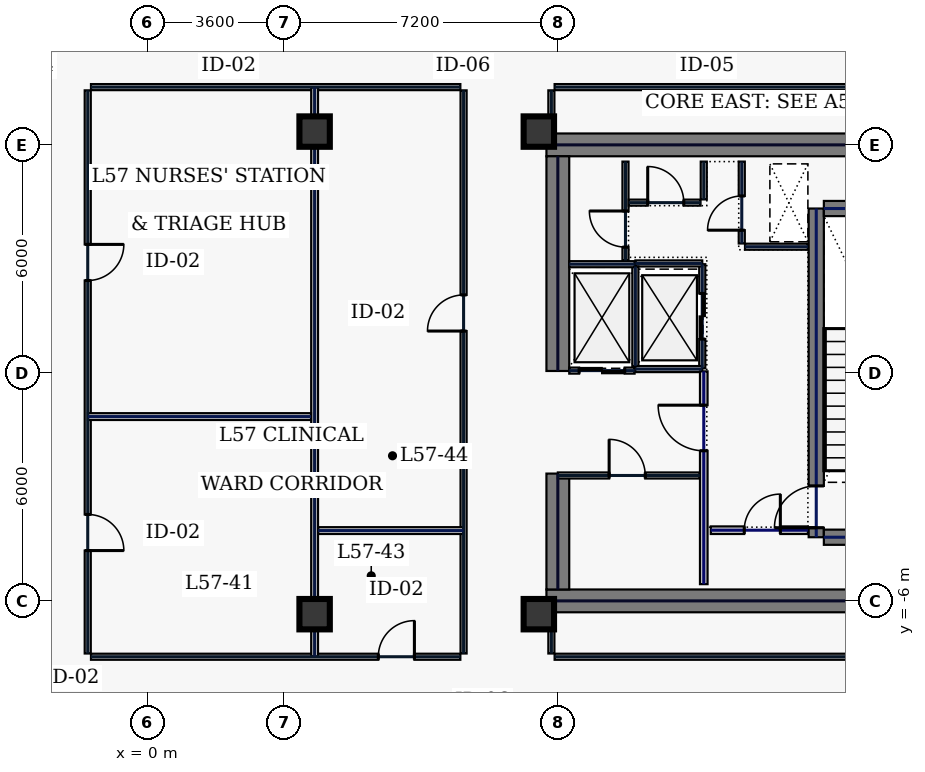
"""IFC4 building model, lengths in metres.
Left out: names, types, materials, properties, quantities, classifications, styles, units other than length and angle.
Written with IfcOpenShell. Run it as: python <this file> out.ifc"""

import sys

from ifc_helpers import new_model, si_unit, direction, frame, frame_2d, origin, origin_2d, place, context, subcontext, project, spatial, rectangle, hollow_rectangle, extrude, element, fill, save


model = new_model("IFC4")
c1 = context("Model", 3, precision=1e-05, world=origin(), true_north=direction((0.0, 1.0)))
c2 = subcontext(c1, "Body", "Model", "MODEL_VIEW")
j1 = project(units=[si_unit("LENGTHUNIT", "METRE"), si_unit("PLANEANGLEUNIT", "RADIAN")], contexts=[c1])
p1 = place(None, origin())
s1 = spatial("IfcSite", under=j1, at=p1, CompositionType="ELEMENT")
p2 = place(p1, origin())
s2 = spatial("IfcBuilding", under=s1, at=p2, CompositionType="ELEMENT")
p3 = place(p2, frame((0.0, 0.0, 247.0)))
s3 = spatial("IfcBuildingStorey", under=s2, at=p3, CompositionType="ELEMENT", Elevation=247.0)
for number, where, z_axis, x_axis in (
    (1, (10.5, 6.0, 0.0), (0.0, 0.0, 1.0), (1.0, 0.0, 0.0)),
    (2, (10.5, -6.0, 0.0), (0.0, 0.0, 1.0), (1.0, 0.0, 0.0)),
):
    element("IfcWall", number, at=place(p3, frame(where, z_axis=z_axis, x_axis=x_axis)), inside=s3, PredefinedType="SHEAR", context=c2, shape_type="SweptSolid", body=[
        extrude(rectangle(XDim=11.5, YDim=0.6, at=frame_2d((5.75, 0.0))), origin(), (0.0, 0.0, 1.0), 3.74),
    ])
p4 = place(p3, frame((10.8, -5.7, 0.0), z_axis=(0.0, 0.0, 1.0), x_axis=(0.0, 1.0, 0.0)))
e3 = element("IfcWall", 3, at=p4, inside=s3, PredefinedType="SHEAR", context=c2, shape_type="SweptSolid", body=[
    extrude(rectangle(XDim=3.05, YDim=0.6, at=frame_2d((1.525, 0.0))), origin(), (0.0, 0.0, 1.0), 3.74),
])
p5 = place(p3, frame((10.8, 0.05, 0.0), z_axis=(0.0, 0.0, 1.0), x_axis=(0.0, 1.0, 0.0)))
e4 = element("IfcWall", 4, at=p5, inside=s3, PredefinedType="SHEAR", context=c2, shape_type="SweptSolid", body=[
    extrude(rectangle(XDim=5.65, YDim=0.6, at=frame_2d((2.825, 0.0))), origin(), (0.0, 0.0, 1.0), 3.74),
])
p6 = place(p3, frame((17.6, -4.325, 0.0), z_axis=(0.0, 0.0, 1.0), x_axis=(0.0, 1.0, 0.0)))
e5 = element("IfcWall", 5, at=p6, inside=s3, PredefinedType="SHEAR", context=c2, shape_type="SweptSolid", body=[
    extrude(rectangle(XDim=8.65, YDim=0.4, at=frame_2d((4.325, 0.0))), origin(), (0.0, 0.0, 1.0), 3.74),
])
p7 = place(p6, frame((0.25, 0.0, 0.0)))
e6 = element("IfcOpeningElement", 6, at=p7, cuts=e5, PredefinedType="OPENING", context=c2, shape_type="SweptSolid", body=[
    extrude(rectangle(XDim=1.1, YDim=2.2, at=frame_2d((0.55, 1.1))), frame((0.0, 0.21, 0.0), z_axis=(0.0, -1.0, 0.0), x_axis=(1.0, 0.0, 0.0)), (0.0, 0.0, 1.0), 0.42),
])
for number, where, z_axis, x_axis in (
    (7, (17.8, -4.325, 0.0), (0.0, 0.0, 1.0), (1.0, 0.0, 0.0)),
    (8, (17.8, 4.325, 0.0), (0.0, 0.0, 1.0), (1.0, 0.0, 0.0)),
):
    element("IfcWall", number, at=place(p3, frame(where, z_axis=z_axis, x_axis=x_axis)), inside=s3, PredefinedType="SHEAR", context=c2, shape_type="SweptSolid", body=[
        extrude(rectangle(XDim=3.4, YDim=0.4, at=frame_2d((1.7, 0.0))), origin(), (0.0, 0.0, 1.0), 3.74),
    ])
for number, where, z_axis, x_axis in (
    (9, (10.3, -6.35, 0.0), (0.0, 0.0, 1.0), (1.0, 0.0, 0.0)),
    (10, (10.3, 6.35, 0.0), (0.0, 0.0, 1.0), (1.0, 0.0, 0.0)),
    (11, (4.4, -6.35, 0.0), (0.0, 0.0, 1.0), (1.0, 0.0, 0.0)),
    (12, (4.4, 6.35, 0.0), (0.0, 0.0, 1.0), (1.0, 0.0, 0.0)),
):
    element("IfcColumn", number, at=place(p3, frame(where, z_axis=z_axis, x_axis=x_axis)), inside=s3, PredefinedType="COLUMN", context=c2, shape_type="SweptSolid", body=[
        extrude(hollow_rectangle(XDim=0.8, YDim=0.8, WallThickness=0.036, at=origin_2d()), origin(), (0.0, 0.0, 1.0), 3.74),
    ])
p8 = place(p3, frame((14.6, 0.12, 0.0), z_axis=(0.0, 0.0, 1.0), x_axis=(0.0, 1.0, 0.0)))
e13 = element("IfcWall", 13, at=p8, inside=s3, PredefinedType="PARTITIONING", context=c2, shape_type="SweptSolid", body=[
    extrude(rectangle(XDim=2.74, YDim=0.16, at=frame_2d((1.37, 0.0))), origin(), (0.0, 0.0, 1.0), 3.74),
])
p9 = place(p8, frame((0.77, 0.0, 0.0)))
e14 = element("IfcOpeningElement", 14, at=p9, cuts=e13, PredefinedType="OPENING", context=c2, shape_type="SweptSolid", body=[
    extrude(rectangle(XDim=1.2, YDim=2.2, at=frame_2d((0.6, 1.1))), frame((0.0, 0.09, 0.0), z_axis=(0.0, -1.0, 0.0), x_axis=(1.0, 0.0, 0.0)), (0.0, 0.0, 1.0), 0.18),
])
for number, where, z_axis, x_axis in (
    (15, (12.84, 0.1, 0.0), (0.0, 0.0, 1.0), (1.0, 0.0, 0.0)),
    (16, (12.84, 2.88, 0.0), (0.0, 0.0, 1.0), (1.0, 0.0, 0.0)),
):
    element("IfcWall", number, at=place(p3, frame(where, z_axis=z_axis, x_axis=x_axis)), inside=s3, PredefinedType="PARTITIONING", context=c2, shape_type="SweptSolid", body=[
        extrude(rectangle(XDim=1.76, YDim=0.16, at=frame_2d((0.88, 0.0))), origin(), (0.0, 0.0, 1.0), 3.74),
    ])
p10 = place(p3, frame((12.84, 0.18, 0.0), z_axis=(0.0, 0.0, 1.0), x_axis=(0.0, 1.0, 0.0)))
e17 = element("IfcWall", 17, at=p10, inside=s3, PredefinedType="PARTITIONING", context=c2, shape_type="SweptSolid", body=[
    extrude(rectangle(XDim=2.62, YDim=0.16, at=frame_2d((1.31, 0.0))), origin(), (0.0, 0.0, 1.0), 3.74),
])
p11 = place(p3, frame((11.1, 0.06, 0.0), z_axis=(0.0, 0.0, 1.0), x_axis=(1.0, 0.0, 0.0)))
e18 = element("IfcWall", 18, at=p11, inside=s3, PredefinedType="PARTITIONING", context=c2, shape_type="SweptSolid", body=[
    extrude(rectangle(XDim=1.72, YDim=0.16, at=frame_2d((0.86, 0.0))), origin(), (0.0, 0.0, 1.0), 3.74),
])
p12 = place(p11, frame((0.26, 0.0, 0.0)))
e19 = element("IfcOpeningElement", 19, at=p12, cuts=e18, PredefinedType="OPENING", context=c2, shape_type="SweptSolid", body=[
    extrude(rectangle(XDim=1.2, YDim=2.2, at=frame_2d((0.6, 1.1))), frame((0.0, 0.09, 0.0), z_axis=(0.0, -1.0, 0.0), x_axis=(1.0, 0.0, 0.0)), (0.0, 0.0, 1.0), 0.18),
])
p13 = place(p3, frame((11.1, 2.86, 0.0), z_axis=(0.0, 0.0, 1.0), x_axis=(1.0, 0.0, 0.0)))
e20 = element("IfcWall", 20, at=p13, inside=s3, PredefinedType="PARTITIONING", context=c2, shape_type="SweptSolid", body=[
    extrude(rectangle(XDim=1.72, YDim=0.16, at=frame_2d((0.86, 0.0))), origin(), (0.0, 0.0, 1.0), 3.74),
])
p14 = place(p3, frame((15.64, 3.405, 0.0), z_axis=(0.0, 0.0, 1.0), x_axis=(0.0, 1.0, 0.0)))
e21 = element("IfcWall", 21, at=p14, inside=s3, PredefinedType="PARTITIONING", context=c2, shape_type="SweptSolid", body=[
    extrude(rectangle(XDim=2.155, YDim=0.16, at=frame_2d((1.078, 0.0))), origin(), (0.0, 0.0, 1.0), 3.74),
])
p15 = place(p14, frame((0.35, 0.0, 0.0)))
e22 = element("IfcOpeningElement", 22, at=p15, cuts=e21, PredefinedType="OPENING", context=c2, shape_type="SweptSolid", body=[
    extrude(rectangle(XDim=0.9, YDim=2.2, at=frame_2d((0.45, 1.1))), frame((0.0, 0.09, 0.0), z_axis=(0.0, -1.0, 0.0), x_axis=(1.0, 0.0, 0.0)), (0.0, 0.0, 1.0), 0.18),
])
p16 = place(p3, frame((15.725, 3.32, 0.0), z_axis=(0.0, 0.0, 1.0), x_axis=(1.0, 0.0, 0.0)))
e23 = element("IfcWall", 23, at=p16, inside=s3, PredefinedType="PARTITIONING", context=c2, shape_type="SweptSolid", body=[
    extrude(rectangle(XDim=1.655, YDim=0.16, at=frame_2d((0.827, 0.0))), origin(), (0.0, 0.0, 1.0), 3.74),
])
p17 = place(p3, frame((14.825, -4.14, 0.0), z_axis=(0.0, 0.0, 1.0), x_axis=(1.0, 0.0, 0.0)))
e24 = element("IfcWall", 24, at=p17, inside=s3, PredefinedType="SOLIDWALL", context=c2, shape_type="SweptSolid", body=[
    extrude(rectangle(XDim=2.555, YDim=0.2, at=frame_2d((1.277, 0.0))), origin(), (0.0, 0.0, 1.0), 3.74),
])
p18 = place(p17, frame((0.88, 0.0, 0.0)))
e25 = element("IfcOpeningElement", 25, at=p18, cuts=e24, PredefinedType="OPENING", context=c2, shape_type="SweptSolid", body=[
    extrude(rectangle(XDim=0.95, YDim=2.2, at=frame_2d((0.475, 1.1))), frame((0.0, 0.11, 0.0), z_axis=(0.0, -1.0, 0.0), x_axis=(1.0, 0.0, 0.0)), (0.0, 0.0, 1.0), 0.22),
])
p19 = place(p3, frame((10.8, -2.7, 0.0), z_axis=(0.0, 0.0, 1.0), x_axis=(1.0, 0.0, 0.0)))
e26 = element("IfcWall", 26, at=p19, inside=s3, PredefinedType="PARTITIONING", context=c2, shape_type="SweptSolid", body=[
    extrude(rectangle(XDim=3.735, YDim=0.16, at=frame_2d((1.867, 0.0))), origin(), (0.0, 0.0, 1.0), 3.74),
])
p20 = place(p19, frame((1.35, 0.0, 0.0)))
e27 = element("IfcOpeningElement", 27, at=p20, cuts=e26, PredefinedType="OPENING", context=c2, shape_type="SweptSolid", body=[
    extrude(rectangle(XDim=0.95, YDim=2.2, at=frame_2d((0.475, 1.1))), frame((0.0, 0.09, 0.0), z_axis=(0.0, -1.0, 0.0), x_axis=(1.0, 0.0, 0.0)), (0.0, 0.0, 1.0), 0.18),
])
p21 = place(p3, frame((12.58, 2.96, 0.0), z_axis=(0.0, 0.0, 1.0), x_axis=(0.0, 1.0, 0.0)))
e28 = element("IfcWall", 28, at=p21, inside=s3, PredefinedType="PARTITIONING", context=c2, shape_type="SweptSolid", body=[
    extrude(rectangle(XDim=2.6, YDim=0.16, at=frame_2d((1.3, 0.0))), origin(), (0.0, 0.0, 1.0), 3.74),
])
p22 = place(p21, frame((0.35, 0.0, 0.0)))
e29 = element("IfcOpeningElement", 29, at=p22, cuts=e28, PredefinedType="OPENING", context=c2, shape_type="SweptSolid", body=[
    extrude(rectangle(XDim=0.95, YDim=2.2, at=frame_2d((0.475, 1.1))), frame((0.0, 0.09, 0.0), z_axis=(0.0, -1.0, 0.0), x_axis=(1.0, 0.0, 0.0)), (0.0, 0.0, 1.0), 0.18),
])
p23 = place(p3, frame((12.665, 4.48, 0.0), z_axis=(0.0, 0.0, 1.0), x_axis=(1.0, 0.0, 0.0)))
e30 = element("IfcWall", 30, at=p23, inside=s3, PredefinedType="PARTITIONING", context=c2, shape_type="SweptSolid", body=[
    extrude(rectangle(XDim=1.89, YDim=0.16, at=frame_2d((0.945, 0.0))), origin(), (0.0, 0.0, 1.0), 3.74),
])
p24 = place(p23, frame((0.5, 0.0, 0.0)))
e31 = element("IfcOpeningElement", 31, at=p24, cuts=e30, PredefinedType="OPENING", context=c2, shape_type="SweptSolid", body=[
    extrude(rectangle(XDim=0.95, YDim=2.2, at=frame_2d((0.475, 1.1))), frame((0.0, 0.09, 0.0), z_axis=(0.0, -1.0, 0.0), x_axis=(1.0, 0.0, 0.0)), (0.0, 0.0, 1.0), 0.18),
])
p25 = place(p3, frame((14.64, 4.565, 0.0), z_axis=(0.0, 0.0, 1.0), x_axis=(0.0, 1.0, 0.0)))
e32 = element("IfcWall", 32, at=p25, inside=s3, PredefinedType="PARTITIONING", context=c2, shape_type="SweptSolid", body=[
    extrude(rectangle(XDim=0.995, YDim=0.16, at=frame_2d((0.498, 0.0))), origin(), (0.0, 0.0, 1.0), 3.74),
])
p26 = place(p3, frame((14.64, -5.56, 0.0), z_axis=(0.0, 0.0, 1.0), x_axis=(0.0, 1.0, 0.0)))
e33 = element("IfcWall", 33, at=p26, inside=s3, PredefinedType="SOLIDWALL", context=c2, shape_type="SweptSolid", body=[
    extrude(rectangle(XDim=5.6, YDim=0.2, at=frame_2d((2.8, 0.0))), origin(), (0.0, 0.0, 1.0), 3.74),
])
p27 = place(p26, frame((3.51, 0.0, 0.0)))
e34 = element("IfcOpeningElement", 34, at=p27, cuts=e33, PredefinedType="OPENING", context=c2, shape_type="SweptSolid", body=[
    extrude(rectangle(XDim=1.2, YDim=2.2, at=frame_2d((0.6, 1.1))), frame((0.0, 0.11, 0.0), z_axis=(0.0, -1.0, 0.0), x_axis=(1.0, 0.0, 0.0)), (0.0, 0.0, 1.0), 0.22),
])
p28 = place(p3, frame((22.585, 7.52, 0.0), z_axis=(0.0, 0.0, 1.0), x_axis=(-1.0, 0.0, 0.0)))
e35 = element("IfcWall", 35, at=p28, inside=s3, PredefinedType="PARTITIONING", context=c2, shape_type="SweptSolid", body=[
    extrude(rectangle(XDim=11.87, YDim=0.16, at=frame_2d((5.935, 0.0))), origin(), (0.0, 0.0, 1.0), 3.74),
])
p29 = place(p3, frame((10.63, 7.435, 0.0), z_axis=(0.0, 0.0, 1.0), x_axis=(0.0, -1.0, 0.0)))
e36 = element("IfcWall", 36, at=p29, inside=s3, PredefinedType="PARTITIONING", context=c2, shape_type="SweptSolid", body=[
    extrude(rectangle(XDim=1.015, YDim=0.16, at=frame_2d((0.508, 0.0))), origin(), (0.0, 0.0, 1.0), 3.74),
])
p30 = place(p3, frame((10.63, -6.42, 0.0), z_axis=(0.0, 0.0, 1.0), x_axis=(0.0, -1.0, 0.0)))
e37 = element("IfcWall", 37, at=p30, inside=s3, PredefinedType="PARTITIONING", context=c2, shape_type="SweptSolid", body=[
    extrude(rectangle(XDim=0.965, YDim=0.16, at=frame_2d((0.482, 0.0))), origin(), (0.0, 0.0, 1.0), 3.74),
])
p31 = place(p3, frame((10.715, -7.47, 0.0), z_axis=(0.0, 0.0, 1.0), x_axis=(1.0, 0.0, 0.0)))
e38 = element("IfcWall", 38, at=p31, inside=s3, PredefinedType="PARTITIONING", context=c2, shape_type="SweptSolid", body=[
    extrude(rectangle(XDim=11.87, YDim=0.16, at=frame_2d((5.935, 0.0))), origin(), (0.0, 0.0, 1.0), 3.74),
])
p32 = place(p3, frame((8.235, 7.52, 0.0), z_axis=(0.0, 0.0, 1.0), x_axis=(-1.0, 0.0, 0.0)))
e39 = element("IfcWall", 39, at=p32, inside=s3, PredefinedType="PARTITIONING", context=c2, shape_type="SweptSolid", body=[
    extrude(rectangle(XDim=9.72, YDim=0.16, at=frame_2d((4.86, 0.0))), origin(), (0.0, 0.0, 1.0), 3.74),
])
p33 = place(p3, frame((-1.57, 7.435, 0.0), z_axis=(0.0, 0.0, 1.0), x_axis=(0.0, -1.0, 0.0)))
e40 = element("IfcWall", 40, at=p33, inside=s3, PredefinedType="PARTITIONING", context=c2, shape_type="SweptSolid", body=[
    extrude(rectangle(XDim=14.82, YDim=0.16, at=frame_2d((7.41, 0.0))), origin(), (0.0, 0.0, 1.0), 3.74),
])
p34 = place(p33, frame((11.161, 0.0, 0.0)))
e41 = element("IfcOpeningElement", 41, at=p34, cuts=e40, PredefinedType="OPENING", context=c2, shape_type="SweptSolid", body=[
    extrude(rectangle(XDim=0.95, YDim=2.2, at=frame_2d((0.475, 1.1))), frame((0.0, 0.09, 0.0), z_axis=(0.0, -1.0, 0.0), x_axis=(1.0, 0.0, 0.0)), (0.0, 0.0, 1.0), 0.18),
])
p35 = place(p33, frame((4.054, 0.0, 0.0)))
e42 = element("IfcOpeningElement", 42, at=p35, cuts=e40, PredefinedType="OPENING", context=c2, shape_type="SweptSolid", body=[
    extrude(rectangle(XDim=0.95, YDim=2.2, at=frame_2d((0.475, 1.1))), frame((0.0, 0.09, 0.0), z_axis=(0.0, -1.0, 0.0), x_axis=(1.0, 0.0, 0.0)), (0.0, 0.0, 1.0), 0.18),
])
p36 = place(p3, frame((-1.485, -7.47, 0.0), z_axis=(0.0, 0.0, 1.0), x_axis=(1.0, 0.0, 0.0)))
e43 = element("IfcWall", 43, at=p36, inside=s3, PredefinedType="PARTITIONING", context=c2, shape_type="SweptSolid", body=[
    extrude(rectangle(XDim=9.72, YDim=0.16, at=frame_2d((4.86, 0.0))), origin(), (0.0, 0.0, 1.0), 3.74),
])
p37 = place(p36, frame((7.561, 0.0, 0.0)))
e44 = element("IfcOpeningElement", 44, at=p37, cuts=e43, PredefinedType="OPENING", context=c2, shape_type="SweptSolid", body=[
    extrude(rectangle(XDim=0.95, YDim=2.2, at=frame_2d((0.475, 1.1))), frame((0.0, 0.09, 0.0), z_axis=(0.0, -1.0, 0.0), x_axis=(1.0, 0.0, 0.0)), (0.0, 0.0, 1.0), 0.18),
])
p38 = place(p3, frame((8.32, -7.385, 0.0), z_axis=(0.0, 0.0, 1.0), x_axis=(0.0, 1.0, 0.0)))
e45 = element("IfcWall", 45, at=p38, inside=s3, PredefinedType="PARTITIONING", context=c2, shape_type="SweptSolid", body=[
    extrude(rectangle(XDim=14.82, YDim=0.16, at=frame_2d((7.41, 0.0))), origin(), (0.0, 0.0, 1.0), 3.74),
])
p39 = place(p38, frame((8.486, 0.0, 0.0)))
e46 = element("IfcOpeningElement", 46, at=p39, cuts=e45, PredefinedType="OPENING", context=c2, shape_type="SweptSolid", body=[
    extrude(rectangle(XDim=0.95, YDim=2.2, at=frame_2d((0.475, 1.1))), frame((0.0, 0.09, 0.0), z_axis=(0.0, -1.0, 0.0), x_axis=(1.0, 0.0, 0.0)), (0.0, 0.0, 1.0), 0.18),
])
p40 = place(p3, frame((4.4, -7.465, 0.0), z_axis=(0.0, 0.0, 1.0), x_axis=(0.0, 1.0, 0.0)))
e47 = element("IfcWall", 47, at=p40, inside=s3, PredefinedType="PARTITIONING", context=c2, shape_type="SweptSolid", body=[
    extrude(rectangle(XDim=14.98, YDim=0.18, at=frame_2d((7.49, 0.0))), origin(), (0.0, 0.0, 1.0), 3.035),
])
p41 = place(p3, frame((-1.565, -1.15, 0.0), z_axis=(0.0, 0.0, 1.0), x_axis=(1.0, 0.0, 0.0)))
e48 = element("IfcWall", 48, at=p41, inside=s3, PredefinedType="PARTITIONING", context=c2, shape_type="SweptSolid", body=[
    extrude(rectangle(XDim=5.87, YDim=0.18, at=frame_2d((2.935, 0.0))), origin(), (0.0, 0.0, 1.0), 3.74),
])
p42 = place(p3, frame((4.495, -4.15, 0.0), z_axis=(0.0, 0.0, 1.0), x_axis=(1.0, 0.0, 0.0)))
e49 = element("IfcWall", 49, at=p42, inside=s3, PredefinedType="PARTITIONING", context=c2, shape_type="SweptSolid", body=[
    extrude(rectangle(XDim=3.82, YDim=0.18, at=frame_2d((1.91, 0.0))), origin(), (0.0, 0.0, 1.0), 3.74),
])
p43 = place(p7, origin())
e50 = element("IfcDoor", 50, at=p43, inside=s3, OperationType="SINGLE_SWING_LEFT", PredefinedType="DOOR", context=c2, shape_type="SweptSolid", body=[
    extrude(rectangle(XDim=1.1, YDim=2.2, at=frame_2d((0.55, 1.1))), frame((0.0, 0.025, 0.0), z_axis=(0.0, -1.0, 0.0), x_axis=(1.0, 0.0, 0.0)), (0.0, 0.0, 1.0), 0.05),
])
fill(e6, e50)
p44 = place(p9, origin())
e51 = element("IfcDoor", 51, at=p44, inside=s3, OperationType="SLIDING_TO_LEFT", PredefinedType="DOOR", context=c2, shape_type="SweptSolid", body=[
    extrude(rectangle(XDim=1.2, YDim=2.2, at=frame_2d((0.6, 1.1))), frame((0.0, 0.025, 0.0), z_axis=(0.0, -1.0, 0.0), x_axis=(1.0, 0.0, 0.0)), (0.0, 0.0, 1.0), 0.05),
])
fill(e14, e51)
p45 = place(p12, origin())
e52 = element("IfcDoor", 52, at=p45, inside=s3, OperationType="SLIDING_TO_LEFT", PredefinedType="DOOR", context=c2, shape_type="SweptSolid", body=[
    extrude(rectangle(XDim=1.2, YDim=2.2, at=frame_2d((0.6, 1.1))), frame((0.0, 0.025, 0.0), z_axis=(0.0, -1.0, 0.0), x_axis=(1.0, 0.0, 0.0)), (0.0, 0.0, 1.0), 0.05),
])
fill(e19, e52)
p46 = place(p15, origin())
e53 = element("IfcDoor", 53, at=p46, inside=s3, OperationType="SINGLE_SWING_LEFT", PredefinedType="DOOR", context=c2, shape_type="SweptSolid", body=[
    extrude(rectangle(XDim=0.9, YDim=2.2, at=frame_2d((0.45, 1.1))), frame((0.0, 0.025, 0.0), z_axis=(0.0, -1.0, 0.0), x_axis=(1.0, 0.0, 0.0)), (0.0, 0.0, 1.0), 0.05),
])
fill(e22, e53)
p47 = place(p18, origin())
e54 = element("IfcDoor", 54, at=p47, inside=s3, OperationType="SINGLE_SWING_RIGHT", PredefinedType="DOOR", context=c2, shape_type="SweptSolid", body=[
    extrude(rectangle(XDim=0.95, YDim=2.2, at=frame_2d((0.475, 1.1))), frame((0.0, 0.025, 0.0), z_axis=(0.0, -1.0, 0.0), x_axis=(1.0, 0.0, 0.0)), (0.0, 0.0, 1.0), 0.05),
])
fill(e25, e54)
p48 = place(p20, origin())
e55 = element("IfcDoor", 55, at=p48, inside=s3, OperationType="SINGLE_SWING_LEFT", PredefinedType="DOOR", context=c2, shape_type="SweptSolid", body=[
    extrude(rectangle(XDim=0.95, YDim=2.2, at=frame_2d((0.475, 1.1))), frame((0.0, 0.025, 0.0), z_axis=(0.0, -1.0, 0.0), x_axis=(1.0, 0.0, 0.0)), (0.0, 0.0, 1.0), 0.05),
])
fill(e27, e55)
p49 = place(p22, origin())
e56 = element("IfcDoor", 56, at=p49, inside=s3, OperationType="SINGLE_SWING_RIGHT", PredefinedType="DOOR", context=c2, shape_type="SweptSolid", body=[
    extrude(rectangle(XDim=0.95, YDim=2.2, at=frame_2d((0.475, 1.1))), frame((0.0, 0.025, 0.0), z_axis=(0.0, -1.0, 0.0), x_axis=(1.0, 0.0, 0.0)), (0.0, 0.0, 1.0), 0.05),
])
fill(e29, e56)
p50 = place(p24, origin())
e57 = element("IfcDoor", 57, at=p50, inside=s3, OperationType="SINGLE_SWING_LEFT", PredefinedType="DOOR", context=c2, shape_type="SweptSolid", body=[
    extrude(rectangle(XDim=0.95, YDim=2.2, at=frame_2d((0.475, 1.1))), frame((0.0, 0.025, 0.0), z_axis=(0.0, -1.0, 0.0), x_axis=(1.0, 0.0, 0.0)), (0.0, 0.0, 1.0), 0.05),
])
fill(e31, e57)
p51 = place(p27, origin())
e58 = element("IfcDoor", 58, at=p51, inside=s3, OperationType="SINGLE_SWING_RIGHT", PredefinedType="DOOR", context=c2, shape_type="SweptSolid", body=[
    extrude(rectangle(XDim=1.2, YDim=2.2, at=frame_2d((0.6, 1.1))), frame((0.0, 0.025, 0.0), z_axis=(0.0, -1.0, 0.0), x_axis=(1.0, 0.0, 0.0)), (0.0, 0.0, 1.0), 0.05),
])
fill(e34, e58)
p52 = place(p34, origin())
e59 = element("IfcDoor", 59, at=p52, inside=s3, OperationType="SINGLE_SWING_RIGHT", PredefinedType="DOOR", context=c2, shape_type="SweptSolid", body=[
    extrude(rectangle(XDim=0.95, YDim=2.2, at=frame_2d((0.475, 1.1))), frame((0.0, 0.025, 0.0), z_axis=(0.0, -1.0, 0.0), x_axis=(1.0, 0.0, 0.0)), (0.0, 0.0, 1.0), 0.05),
])
fill(e41, e59)
p53 = place(p35, origin())
e60 = element("IfcDoor", 60, at=p53, inside=s3, OperationType="SINGLE_SWING_LEFT", PredefinedType="DOOR", context=c2, shape_type="SweptSolid", body=[
    extrude(rectangle(XDim=0.95, YDim=2.2, at=frame_2d((0.475, 1.1))), frame((0.0, 0.025, 0.0), z_axis=(0.0, -1.0, 0.0), x_axis=(1.0, 0.0, 0.0)), (0.0, 0.0, 1.0), 0.05),
])
fill(e42, e60)
p54 = place(p37, origin())
e61 = element("IfcDoor", 61, at=p54, inside=s3, OperationType="SINGLE_SWING_RIGHT", PredefinedType="DOOR", context=c2, shape_type="SweptSolid", body=[
    extrude(rectangle(XDim=0.95, YDim=2.2, at=frame_2d((0.475, 1.1))), frame((0.0, 0.025, 0.0), z_axis=(0.0, -1.0, 0.0), x_axis=(1.0, 0.0, 0.0)), (0.0, 0.0, 1.0), 0.05),
])
fill(e44, e61)
p55 = place(p39, origin())
e62 = element("IfcDoor", 62, at=p55, inside=s3, OperationType="SINGLE_SWING_LEFT", PredefinedType="DOOR", context=c2, shape_type="SweptSolid", body=[
    extrude(rectangle(XDim=0.95, YDim=2.2, at=frame_2d((0.475, 1.1))), frame((0.0, 0.025, 0.0), z_axis=(0.0, -1.0, 0.0), x_axis=(1.0, 0.0, 0.0)), (0.0, 0.0, 1.0), 0.05),
])
fill(e46, e62)
save(model, sys.argv[1])
